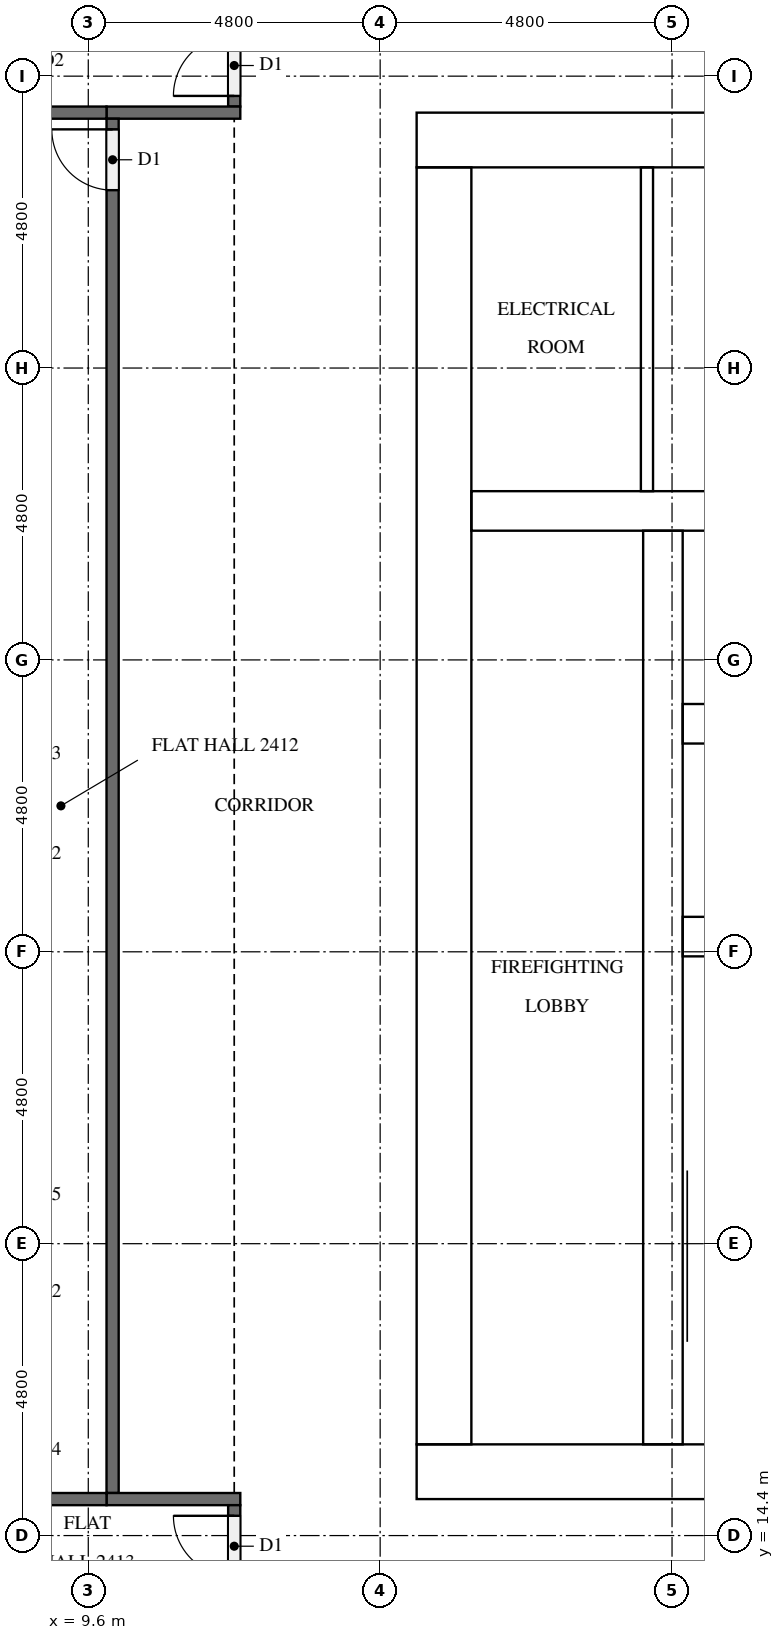
"""IFC4 building model, lengths in metres.
Left out: names, types, materials, properties, quantities, classifications, styles, units other than length and angle.
Written with IfcOpenShell. Run it as: python <this file> out.ifc"""

import sys

from ifc_helpers import new_model, si_unit, direction, frame, frame_2d, origin, place, context, subcontext, project, spatial, rectangle, extrude, element, fill, save


model = new_model("IFC4")
c1 = context("Model", 3, precision=1e-05, world=origin(), true_north=direction((0.0, 1.0)))
c2 = subcontext(c1, "Body", "Model", "MODEL_VIEW")
j1 = project(units=[si_unit("LENGTHUNIT", "METRE"), si_unit("PLANEANGLEUNIT", "RADIAN")], contexts=[c1])
p1 = place(None, origin())
s1 = spatial("IfcSite", under=j1, at=p1, CompositionType="ELEMENT")
p2 = place(p1, origin())
s2 = spatial("IfcBuilding", under=s1, at=p2, CompositionType="ELEMENT")
p3 = place(p2, frame((0.0, 0.0, 96.2)))
s3 = spatial("IfcBuildingStorey", under=s2, at=p3, CompositionType="ELEMENT", Elevation=96.2)
p4 = place(p3, frame((15.0, 15.45, 0.0), z_axis=(0.0, 0.0, 1.0), x_axis=(1.0, 0.0, 0.0)))
e1 = element("IfcWall", 1, at=p4, inside=s3, PredefinedType="SHEAR", context=c2, shape_type="SweptSolid", body=[
    extrude(rectangle(XDim=32.4, YDim=0.9, at=frame_2d((16.2, 0.0))), origin(), (0.0, 0.0, 1.0), 3.2),
])
p5 = place(p4, frame((15.3, 0.0, 0.0)))
e2 = element("IfcOpeningElement", 2, at=p5, cuts=e1, PredefinedType="OPENING", context=c2, shape_type="SweptSolid", body=[
    extrude(rectangle(XDim=1.8, YDim=2.1, at=frame_2d((0.9, 1.05))), frame((0.0, 0.46, 0.0), z_axis=(0.0, -1.0, 0.0), x_axis=(1.0, 0.0, 0.0)), (0.0, 0.0, 1.0), 0.92),
])
p6 = place(p3, frame((15.0, 37.35, 0.0), z_axis=(0.0, 0.0, 1.0), x_axis=(1.0, 0.0, 0.0)))
e3 = element("IfcWall", 3, at=p6, inside=s3, PredefinedType="SHEAR", context=c2, shape_type="SweptSolid", body=[
    extrude(rectangle(XDim=32.4, YDim=0.9, at=frame_2d((16.2, 0.0))), origin(), (0.0, 0.0, 1.0), 3.2),
])
p7 = place(p6, frame((15.3, 0.0, 0.0)))
e4 = element("IfcOpeningElement", 4, at=p7, cuts=e3, PredefinedType="OPENING", context=c2, shape_type="SweptSolid", body=[
    extrude(rectangle(XDim=1.8, YDim=2.1, at=frame_2d((0.9, 1.05))), frame((0.0, 0.46, 0.0), z_axis=(0.0, -1.0, 0.0), x_axis=(1.0, 0.0, 0.0)), (0.0, 0.0, 1.0), 0.92),
])
p8 = place(p6, frame((1.794, 0.0, 0.0)))
e5 = element("IfcOpeningElement", 5, at=p8, cuts=e3, PredefinedType="OPENING", context=c2, shape_type="SweptSolid", body=[
    extrude(rectangle(XDim=1.0, YDim=2.1, at=frame_2d((0.5, 1.05))), frame((0.0, 0.46, 0.0), z_axis=(0.0, -1.0, 0.0), x_axis=(1.0, 0.0, 0.0)), (0.0, 0.0, 1.0), 0.92),
])
p9 = place(p6, frame((5.331, 0.0, 0.0)))
e6 = element("IfcOpeningElement", 6, at=p9, cuts=e3, PredefinedType="OPENING", context=c2, shape_type="SweptSolid", body=[
    extrude(rectangle(XDim=1.0, YDim=2.1, at=frame_2d((0.5, 1.05))), frame((0.0, 0.46, 0.0), z_axis=(0.0, -1.0, 0.0), x_axis=(1.0, 0.0, 0.0)), (0.0, 0.0, 1.0), 0.92),
])
p10 = place(p3, frame((15.45, 15.9, 0.0), z_axis=(0.0, 0.0, 1.0), x_axis=(0.0, 1.0, 0.0)))
e7 = element("IfcWall", 7, at=p10, inside=s3, PredefinedType="SHEAR", context=c2, shape_type="SweptSolid", body=[
    extrude(rectangle(XDim=21.0, YDim=0.9, at=frame_2d((10.5, 0.0))), origin(), (0.0, 0.0, 1.0), 3.2),
])
p11 = place(p10, frame((4.86, 0.0, 0.0)))
e8 = element("IfcOpeningElement", 8, at=p11, cuts=e7, PredefinedType="OPENING", context=c2, shape_type="SweptSolid", body=[
    extrude(rectangle(XDim=1.2, YDim=2.1, at=frame_2d((0.6, 1.05))), frame((0.0, 0.46, 0.0), z_axis=(0.0, -1.0, 0.0), x_axis=(1.0, 0.0, 0.0)), (0.0, 0.0, 1.0), 0.92),
])
p12 = place(p3, frame((19.05, 15.9, 0.0), z_axis=(0.0, 0.0, 1.0), x_axis=(0.0, 1.0, 0.0)))
e9 = element("IfcWall", 9, at=p12, inside=s3, PredefinedType="SHEAR", context=c2, shape_type="SweptSolid", body=[
    extrude(rectangle(XDim=15.025, YDim=0.65, at=frame_2d((7.513, 0.0))), origin(), (0.0, 0.0, 1.0), 3.2),
])
p13 = place(p12, frame((9.55, 0.0, 0.0)))
e10 = element("IfcOpeningElement", 10, at=p13, cuts=e9, PredefinedType="OPENING", context=c2, shape_type="SweptSolid", body=[
    extrude(rectangle(XDim=1.1, YDim=2.1, at=frame_2d((0.55, 1.05))), frame((0.0, 0.335, 0.0), z_axis=(0.0, -1.0, 0.0), x_axis=(1.0, 0.0, 0.0)), (0.0, 0.0, 1.0), 0.67),
])
p14 = place(p12, frame((13.05, 0.0, 0.0)))
e11 = element("IfcOpeningElement", 11, at=p14, cuts=e9, PredefinedType="OPENING", context=c2, shape_type="SweptSolid", body=[
    extrude(rectangle(XDim=1.1, YDim=2.1, at=frame_2d((0.55, 1.05))), frame((0.0, 0.335, 0.0), z_axis=(0.0, -1.0, 0.0), x_axis=(1.0, 0.0, 0.0)), (0.0, 0.0, 1.0), 0.67),
])
p15 = place(p12, frame((0.3, 0.0, 0.0)))
e12 = element("IfcOpeningElement", 12, at=p15, cuts=e9, PredefinedType="OPENING", context=c2, shape_type="SweptSolid", body=[
    extrude(rectangle(XDim=1.2, YDim=2.1, at=frame_2d((0.6, 1.05))), frame((0.0, 0.335, 0.0), z_axis=(0.0, -1.0, 0.0), x_axis=(1.0, 0.0, 0.0)), (0.0, 0.0, 1.0), 0.67),
])
for number, where, z_axis, x_axis in (
    (13, (19.375, 24.25, 0.0), (0.0, 0.0, 1.0), (1.0, 0.0, 0.0)),
    (14, (19.375, 27.75, 0.0), (0.0, 0.0, 1.0), (1.0, 0.0, 0.0)),
):
    element("IfcWall", number, at=place(p3, frame(where, z_axis=z_axis, x_axis=x_axis)), inside=s3, PredefinedType="SHEAR", context=c2, shape_type="SweptSolid", body=[
        extrude(rectangle(XDim=3.4, YDim=0.65, at=frame_2d((1.7, 0.0))), origin(), (0.0, 0.0, 1.0), 3.2),
    ])
p16 = place(p3, frame((15.9, 31.25, 0.0), z_axis=(0.0, 0.0, 1.0), x_axis=(1.0, 0.0, 0.0)))
e15 = element("IfcWall", 15, at=p16, inside=s3, PredefinedType="SHEAR", context=c2, shape_type="SweptSolid", body=[
    extrude(rectangle(XDim=6.875, YDim=0.65, at=frame_2d((3.438, 0.0))), origin(), (0.0, 0.0, 1.0), 3.2),
])
p17 = place(p3, frame((18.788, 31.575, 0.0), z_axis=(0.0, 0.0, 1.0), x_axis=(0.0, 1.0, 0.0)))
e16 = element("IfcWall", 16, at=p17, inside=s3, PredefinedType="PARTITIONING", context=c2, shape_type="SweptSolid", body=[
    extrude(rectangle(XDim=5.325, YDim=0.2, at=frame_2d((2.663, 0.0))), origin(), (0.0, 0.0, 1.0), 3.2),
])
p18 = place(p3, frame((12.0, 37.9, 0.0), z_axis=(0.0, 0.0, 1.0), x_axis=(0.0, 1.0, 0.0)))
e17 = element("IfcWall", 17, at=p18, inside=s3, PredefinedType="PARTITIONING", context=c2, shape_type="SweptSolid", body=[
    extrude(rectangle(XDim=2.8, YDim=0.2, at=frame_2d((1.4, 0.0))), origin(), (0.0, 0.0, 1.0), 3.2),
])
p19 = place(p18, frame((0.175, 0.0, 0.0)))
e18 = element("IfcOpeningElement", 18, at=p19, cuts=e17, PredefinedType="OPENING", context=c2, shape_type="SweptSolid", body=[
    extrude(rectangle(XDim=1.0, YDim=2.1, at=frame_2d((0.5, 1.05))), frame((0.0, 0.11, 0.0), z_axis=(0.0, -1.0, 0.0), x_axis=(1.0, 0.0, 0.0)), (0.0, 0.0, 1.0), 0.22),
])
p20 = place(p3, frame((12.1, 37.8, 0.0), z_axis=(0.0, 0.0, 1.0), x_axis=(-1.0, 0.0, 0.0)))
e19 = element("IfcWall", 19, at=p20, inside=s3, PredefinedType="PARTITIONING", context=c2, shape_type="SweptSolid", body=[
    extrude(rectangle(XDim=2.2, YDim=0.2, at=frame_2d((1.1, 0.0))), origin(), (0.0, 0.0, 1.0), 3.2),
])
p21 = place(p3, frame((10.0, 15.1, 0.0), z_axis=(0.0, 0.0, 1.0), x_axis=(0.0, 1.0, 0.0)))
e20 = element("IfcWall", 20, at=p21, inside=s3, PredefinedType="PARTITIONING", context=c2, shape_type="SweptSolid", body=[
    extrude(rectangle(XDim=22.6, YDim=0.2, at=frame_2d((11.3, 0.0))), origin(), (0.0, 0.0, 1.0), 3.2),
])
p22 = place(p21, frame((21.425, 0.0, 0.0)))
e21 = element("IfcOpeningElement", 21, at=p22, cuts=e20, PredefinedType="OPENING", context=c2, shape_type="SweptSolid", body=[
    extrude(rectangle(XDim=1.0, YDim=2.1, at=frame_2d((0.5, 1.05))), frame((0.0, 0.11, 0.0), z_axis=(0.0, -1.0, 0.0), x_axis=(1.0, 0.0, 0.0)), (0.0, 0.0, 1.0), 0.22),
])
p23 = place(p3, frame((9.9, 15.0, 0.0), z_axis=(0.0, 0.0, 1.0), x_axis=(1.0, 0.0, 0.0)))
e22 = element("IfcWall", 22, at=p23, inside=s3, PredefinedType="PARTITIONING", context=c2, shape_type="SweptSolid", body=[
    extrude(rectangle(XDim=2.2, YDim=0.2, at=frame_2d((1.1, 0.0))), origin(), (0.0, 0.0, 1.0), 3.2),
])
p24 = place(p3, frame((12.0, 12.1, 0.0), z_axis=(0.0, 0.0, 1.0), x_axis=(0.0, 1.0, 0.0)))
e23 = element("IfcWall", 23, at=p24, inside=s3, PredefinedType="PARTITIONING", context=c2, shape_type="SweptSolid", body=[
    extrude(rectangle(XDim=2.8, YDim=0.2, at=frame_2d((1.4, 0.0))), origin(), (0.0, 0.0, 1.0), 3.2),
])
p25 = place(p24, frame((1.625, 0.0, 0.0)))
e24 = element("IfcOpeningElement", 24, at=p25, cuts=e23, PredefinedType="OPENING", context=c2, shape_type="SweptSolid", body=[
    extrude(rectangle(XDim=1.0, YDim=2.1, at=frame_2d((0.5, 1.05))), frame((0.0, 0.11, 0.0), z_axis=(0.0, -1.0, 0.0), x_axis=(1.0, 0.0, 0.0)), (0.0, 0.0, 1.0), 0.22),
])
p26 = place(p3, frame((5.225, 37.8, 0.0), z_axis=(0.0, 0.0, 1.0), x_axis=(1.0, 0.0, 0.0)))
e25 = element("IfcWall", 25, at=p26, inside=s3, PredefinedType="PARTITIONING", context=c2, shape_type="SweptSolid", body=[
    extrude(rectangle(XDim=4.675, YDim=0.2, at=frame_2d((2.337, 0.0))), origin(), (0.0, 0.0, 1.0), 3.2),
])
p27 = place(p3, frame((4.9, 15.0, 0.0), z_axis=(0.0, 0.0, 1.0), x_axis=(1.0, 0.0, 0.0)))
e26 = element("IfcWall", 26, at=p27, inside=s3, PredefinedType="PARTITIONING", context=c2, shape_type="SweptSolid", body=[
    extrude(rectangle(XDim=5.0, YDim=0.2, at=frame_2d((2.5, 0.0))), origin(), (0.0, 0.0, 1.0), 3.2),
])
p28 = place(p13, origin())
e27 = element("IfcDoor", 27, at=p28, inside=s3, OperationType="DOUBLE_DOOR_SLIDING", PredefinedType="DOOR", context=c2, shape_type="SweptSolid", body=[
    extrude(rectangle(XDim=1.1, YDim=2.1, at=frame_2d((0.55, 1.05))), frame((0.0, 0.025, 0.0), z_axis=(0.0, -1.0, 0.0), x_axis=(1.0, 0.0, 0.0)), (0.0, 0.0, 1.0), 0.05),
])
fill(e10, e27)
p29 = place(p14, origin())
e28 = element("IfcDoor", 28, at=p29, inside=s3, OperationType="DOUBLE_DOOR_SLIDING", PredefinedType="DOOR", context=c2, shape_type="SweptSolid", body=[
    extrude(rectangle(XDim=1.1, YDim=2.1, at=frame_2d((0.55, 1.05))), frame((0.0, 0.025, 0.0), z_axis=(0.0, -1.0, 0.0), x_axis=(1.0, 0.0, 0.0)), (0.0, 0.0, 1.0), 0.05),
])
fill(e11, e28)
p30 = place(p15, frame((1.2, 0.0, 0.0), z_axis=(0.0, 0.0, 1.0), x_axis=(-1.0, 0.0, 0.0)))
e29 = element("IfcDoor", 29, at=p30, inside=s3, OperationType="SINGLE_SWING_RIGHT", PredefinedType="DOOR", context=c2, shape_type="SweptSolid", body=[
    extrude(rectangle(XDim=1.2, YDim=2.1, at=frame_2d((0.6, 1.05))), frame((0.0, 0.025, 0.0), z_axis=(0.0, -1.0, 0.0), x_axis=(1.0, 0.0, 0.0)), (0.0, 0.0, 1.0), 0.05),
])
fill(e12, e29)
p31 = place(p11, frame((1.2, 0.0, 0.0), z_axis=(0.0, 0.0, 1.0), x_axis=(-1.0, 0.0, 0.0)))
e30 = element("IfcDoor", 30, at=p31, inside=s3, OperationType="SINGLE_SWING_LEFT", PredefinedType="DOOR", context=c2, shape_type="SweptSolid", body=[
    extrude(rectangle(XDim=1.2, YDim=2.1, at=frame_2d((0.6, 1.05))), frame((0.0, 0.025, 0.0), z_axis=(0.0, -1.0, 0.0), x_axis=(1.0, 0.0, 0.0)), (0.0, 0.0, 1.0), 0.05),
])
fill(e8, e30)
p32 = place(p8, origin())
e31 = element("IfcDoor", 31, at=p32, inside=s3, OperationType="SINGLE_SWING_LEFT", PredefinedType="DOOR", context=c2, shape_type="SweptSolid", body=[
    extrude(rectangle(XDim=1.0, YDim=2.1, at=frame_2d((0.5, 1.05))), frame((0.0, 0.025, 0.0), z_axis=(0.0, -1.0, 0.0), x_axis=(1.0, 0.0, 0.0)), (0.0, 0.0, 1.0), 0.05),
])
fill(e5, e31)
p33 = place(p19, origin())
e32 = element("IfcDoor", 32, at=p33, inside=s3, OperationType="SINGLE_SWING_LEFT", PredefinedType="DOOR", context=c2, shape_type="SweptSolid", body=[
    extrude(rectangle(XDim=1.0, YDim=2.1, at=frame_2d((0.5, 1.05))), frame((0.0, 0.025, 0.0), z_axis=(0.0, -1.0, 0.0), x_axis=(1.0, 0.0, 0.0)), (0.0, 0.0, 1.0), 0.05),
])
fill(e18, e32)
p34 = place(p22, origin())
e33 = element("IfcDoor", 33, at=p34, inside=s3, OperationType="SINGLE_SWING_RIGHT", PredefinedType="DOOR", context=c2, shape_type="SweptSolid", body=[
    extrude(rectangle(XDim=1.0, YDim=2.1, at=frame_2d((0.5, 1.05))), frame((0.0, 0.025, 0.0), z_axis=(0.0, -1.0, 0.0), x_axis=(1.0, 0.0, 0.0)), (0.0, 0.0, 1.0), 0.05),
])
fill(e21, e33)
p35 = place(p25, origin())
e34 = element("IfcDoor", 34, at=p35, inside=s3, OperationType="SINGLE_SWING_RIGHT", PredefinedType="DOOR", context=c2, shape_type="SweptSolid", body=[
    extrude(rectangle(XDim=1.0, YDim=2.1, at=frame_2d((0.5, 1.05))), frame((0.0, 0.025, 0.0), z_axis=(0.0, -1.0, 0.0), x_axis=(1.0, 0.0, 0.0)), (0.0, 0.0, 1.0), 0.05),
])
fill(e24, e34)
save(model, sys.argv[1])
